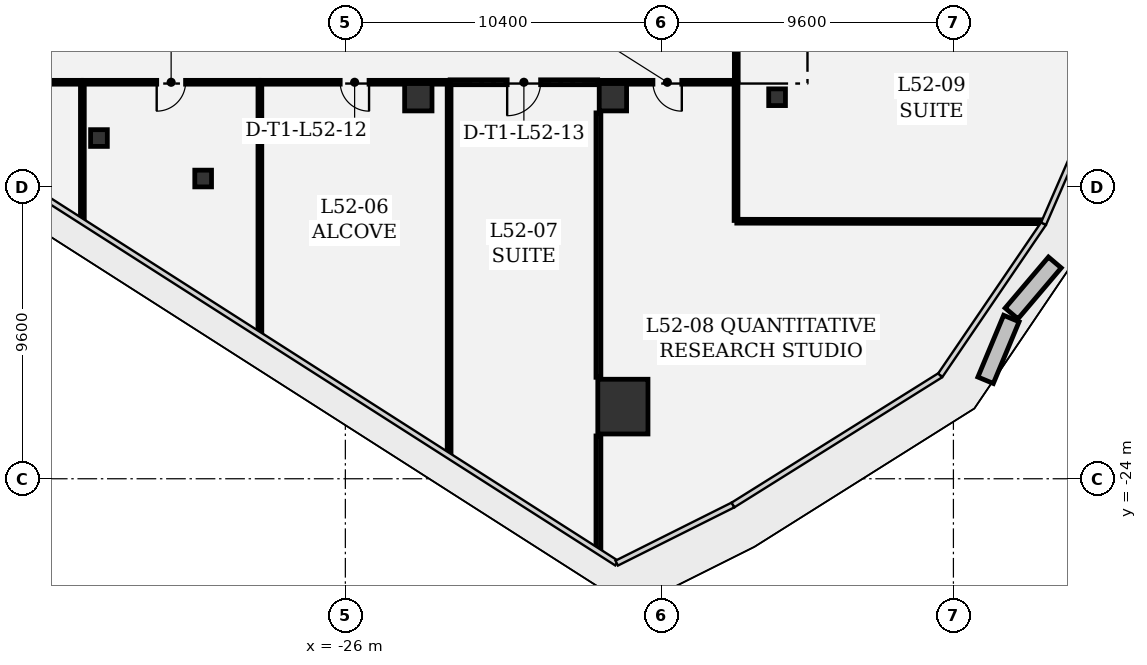
"""IFC4 building model, lengths in metres.
Left out: names, types, materials, properties, quantities, classifications, styles, units other than length and angle.
Written with IfcOpenShell. Run it as: python <this file> out.ifc"""

import sys

from ifc_helpers import new_model, si_unit, direction, frame, frame_2d, origin, origin_2d, place, context, subcontext, project, spatial, rectangle, extrude, element, fill, save


model = new_model("IFC4")
c1 = context("Model", 3, precision=1e-05, world=origin(), true_north=direction((0.0, 1.0)))
c2 = subcontext(c1, "Body", "Model", "MODEL_VIEW")
j1 = project(units=[si_unit("LENGTHUNIT", "METRE"), si_unit("PLANEANGLEUNIT", "RADIAN")], contexts=[c1])
p1 = place(None, origin())
s1 = spatial("IfcSite", under=j1, at=p1, CompositionType="ELEMENT")
p2 = place(p1, origin())
s2 = spatial("IfcBuilding", under=s1, at=p2, CompositionType="ELEMENT")
p3 = place(p2, frame((0.0, 0.0, 225.3)))
s3 = spatial("IfcBuildingStorey", under=s2, at=p3, CompositionType="ELEMENT", Elevation=225.3)
p4 = place(p3, frame((-16.872, -21.627, 0.0), z_axis=(0.0, 0.0, 1.0), x_axis=(1.0, 0.0, 0.0)))
e1 = element("IfcColumn", 1, at=p4, inside=s3, PredefinedType="COLUMN", context=c2, shape_type="SweptSolid", body=[
    extrude(rectangle(XDim=1.65, YDim=1.8, at=origin_2d()), origin(), (0.0, 0.0, 1.0), 4.05),
])
for number, where, z_axis, x_axis in (
    (2, (-17.2, -11.45, 0.0), (0.0, 0.0, 1.0), (1.0, 0.0, 0.0)),
    (3, (-23.6, -11.45, 0.0), (0.0, 0.0, 1.0), (1.0, 0.0, 0.0)),
):
    element("IfcColumn", number, at=place(p3, frame(where, z_axis=z_axis, x_axis=x_axis)), inside=s3, PredefinedType="COLUMN", context=c2, shape_type="SweptSolid", body=[
        extrude(rectangle(XDim=0.9, YDim=0.9, at=origin_2d()), origin(), (0.0, 0.0, 1.0), 4.05),
    ])
for number, where, z_axis, x_axis in (
    (4, (-34.104, -12.792, 0.0), (0.0, 0.0, 1.0), (1.0, 0.0, 0.0)),
    (5, (-30.677, -14.124, 0.0), (0.0, 0.0, 1.0), (1.0, 0.0, 0.0)),
    (6, (-11.8, -11.45, 0.0), (0.0, 0.0, 1.0), (1.0, 0.0, 0.0)),
):
    element("IfcColumn", number, at=place(p3, frame(where, z_axis=z_axis, x_axis=x_axis)), inside=s3, PredefinedType="COLUMN", context=c2, shape_type="SweptSolid", body=[
        extrude(rectangle(XDim=0.55, YDim=0.55, at=origin_2d()), origin(), (0.0, 0.0, 1.0), 4.05),
    ])
p5 = place(p3, frame((-28.836, -10.958, 0.0), z_axis=(0.0, 0.0, 1.0), x_axis=(-1.0, 0.0, 0.0)))
e7 = element("IfcWall", 7, at=p5, inside=s3, PredefinedType="PARTITIONING", context=c2, shape_type="SweptSolid", body=[
    extrude(rectangle(XDim=5.789, YDim=0.125, at=frame_2d((2.895, 0.0))), origin(), (0.0, 0.0, 1.0), 3.0),
])
p6 = place(p5, frame((2.419, 0.0, 0.0)))
e8 = element("IfcOpeningElement", 8, at=p6, cuts=e7, PredefinedType="OPENING", context=c2, shape_type="SweptSolid", body=[
    extrude(rectangle(XDim=0.95, YDim=2.15, at=frame_2d((0.475, 1.075))), frame((0.0, 0.073, 0.0), z_axis=(0.0, -1.0, 0.0), x_axis=(1.0, 0.0, 0.0)), (0.0, 0.0, 1.0), 0.145),
])
p7 = place(p3, frame((-34.65, -10.983, 0.0), z_axis=(0.0, 0.0, 1.0), x_axis=(0.0, -1.0, 0.0)))
e9 = element("IfcWall", 9, at=p7, inside=s3, PredefinedType="PARTITIONING", context=c2, shape_type="SweptSolid", body=[
    extrude(rectangle(XDim=4.479, YDim=0.125, at=frame_2d((2.24, 0.0))), origin(), (0.0, 0.0, 1.0), 3.78),
])
p8 = place(p3, frame((-28.811, -19.194, 0.0), z_axis=(0.0, 0.0, 1.0), x_axis=(0.0, 1.0, 0.0)))
e10 = element("IfcWall", 10, at=p8, inside=s3, PredefinedType="PARTITIONING", context=c2, shape_type="SweptSolid", body=[
    extrude(rectangle(XDim=8.211, YDim=0.125, at=frame_2d((4.105, 0.0))), origin(), (0.0, 0.0, 1.0), 3.78),
])
p9 = place(p3, frame((-22.612, -10.958, 0.0), z_axis=(0.0, 0.0, 1.0), x_axis=(-1.0, 0.0, 0.0)))
e11 = element("IfcWall", 11, at=p9, inside=s3, PredefinedType="PARTITIONING", context=c2, shape_type="SweptSolid", body=[
    extrude(rectangle(XDim=6.166, YDim=0.125, at=frame_2d((3.083, 0.0))), origin(), (0.0, 0.0, 1.0), 3.78),
])
p10 = place(p9, frame((2.608, 0.0, 0.0)))
e12 = element("IfcOpeningElement", 12, at=p10, cuts=e11, PredefinedType="OPENING", context=c2, shape_type="SweptSolid", body=[
    extrude(rectangle(XDim=0.95, YDim=2.15, at=frame_2d((0.475, 1.075))), frame((0.0, 0.073, 0.0), z_axis=(0.0, -1.0, 0.0), x_axis=(1.0, 0.0, 0.0)), (0.0, 0.0, 1.0), 0.145),
])
p11 = place(p3, frame((-22.587, -23.172, 0.0), z_axis=(0.0, 0.0, 1.0), x_axis=(0.0, 1.0, 0.0)))
e13 = element("IfcWall", 13, at=p11, inside=s3, PredefinedType="PARTITIONING", context=c2, shape_type="SweptSolid", body=[
    extrude(rectangle(XDim=12.189, YDim=0.125, at=frame_2d((6.094, 0.0))), origin(), (0.0, 0.0, 1.0), 2.977),
])
p12 = place(p3, frame((-17.676, -26.311, 0.0), z_axis=(0.0, 0.0, 1.0), x_axis=(0.0, 1.0, 0.0)))
e14 = element("IfcWall", 14, at=p12, inside=s3, PredefinedType="PARTITIONING", context=c2, shape_type="SweptSolid", body=[
    extrude(rectangle(XDim=3.719, YDim=0.16, at=frame_2d((1.859, 0.0))), origin(), (0.0, 0.0, 1.0), 3.78),
])
p13 = place(p3, frame((-17.676, -20.662, 0.0), z_axis=(0.0, 0.0, 1.0), x_axis=(0.0, 1.0, 0.0)))
e15 = element("IfcWall", 15, at=p13, inside=s3, PredefinedType="PARTITIONING", context=c2, shape_type="SweptSolid", body=[
    extrude(rectangle(XDim=8.697, YDim=0.16, at=frame_2d((4.349, 0.0))), origin(), (0.0, 0.0, 1.0), 2.977),
])
p14 = place(p3, frame((-17.701, -10.958, 0.0), z_axis=(0.0, 0.0, 1.0), x_axis=(-1.0, 0.0, 0.0)))
e16 = element("IfcWall", 16, at=p14, inside=s3, PredefinedType="PARTITIONING", context=c2, shape_type="SweptSolid", body=[
    extrude(rectangle(XDim=4.853, YDim=0.16, at=frame_2d((2.427, 0.0))), origin(), (0.0, 0.0, 1.0), 3.344),
])
p15 = place(p14, frame((1.877, 0.0, 0.0)))
e17 = element("IfcOpeningElement", 17, at=p15, cuts=e16, PredefinedType="OPENING", context=c2, shape_type="SweptSolid", body=[
    extrude(rectangle(XDim=1.1, YDim=2.15, at=frame_2d((0.55, 1.075))), frame((0.0, 0.09, 0.0), z_axis=(0.0, -1.0, 0.0), x_axis=(1.0, 0.0, 0.0)), (0.0, 0.0, 1.0), 0.18),
])
p16 = place(p3, frame((-3.088, -15.545, 0.0), z_axis=(0.0, 0.0, 1.0), x_axis=(-0.999998671921, 0.001629771613, 0.0)))
e18 = element("IfcWall", 18, at=p16, inside=s3, PredefinedType="PARTITIONING", context=c2, shape_type="SweptSolid", body=[
    extrude(rectangle(XDim=10.037, YDim=0.125, at=frame_2d((5.018, 0.0))), origin(), (0.0, 0.0, 1.0), 3.78),
])
p17 = place(p3, frame((-13.15, -10.983, 0.0), z_axis=(0.0, 0.0, 1.0), x_axis=(0.0, -1.0, 0.0)))
e19 = element("IfcWall", 19, at=p17, inside=s3, PredefinedType="PARTITIONING", context=c2, shape_type="SweptSolid", body=[
    extrude(rectangle(XDim=4.521, YDim=0.125, at=frame_2d((2.26, 0.0))), origin(), (0.0, 0.0, 1.0), 3.78),
])
p18 = place(p3, frame((-13.175, -10.958, 0.0), z_axis=(0.0, 0.0, 1.0), x_axis=(-1.0, 0.0, 0.0)))
e20 = element("IfcWall", 20, at=p18, inside=s3, PredefinedType="PARTITIONING", context=c2, shape_type="SweptSolid", body=[
    extrude(rectangle(XDim=4.468, YDim=0.125, at=frame_2d((2.234, 0.0))), origin(), (0.0, 0.0, 1.0), 3.344),
])
p19 = place(p18, frame((1.759, 0.0, 0.0)))
e21 = element("IfcOpeningElement", 21, at=p19, cuts=e20, PredefinedType="OPENING", context=c2, shape_type="SweptSolid", body=[
    extrude(rectangle(XDim=0.95, YDim=2.15, at=frame_2d((0.475, 1.075))), frame((0.0, 0.073, 0.0), z_axis=(0.0, -1.0, 0.0), x_axis=(1.0, 0.0, 0.0)), (0.0, 0.0, 1.0), 0.145),
])
p20 = place(p3, frame((-13.142, -7.506, 0.0), z_axis=(0.0, 0.0, 1.0), x_axis=(0.0, -1.0, 0.0)))
e22 = element("IfcWall", 22, at=p20, inside=s3, PredefinedType="PARTITIONING", context=c2, shape_type="SweptSolid", body=[
    extrude(rectangle(XDim=3.452, YDim=0.125, at=frame_2d((1.726, 0.0))), origin(), (0.0, 0.0, 1.0), 3.0),
])
p21 = place(p20, frame((1.251, 0.0, 0.0)))
e23 = element("IfcOpeningElement", 23, at=p21, cuts=e22, PredefinedType="OPENING", context=c2, shape_type="SweptSolid", body=[
    extrude(rectangle(XDim=0.95, YDim=2.15, at=frame_2d((0.475, 1.075))), frame((0.0, 0.073, 0.0), z_axis=(0.0, -1.0, 0.0), x_axis=(1.0, 0.0, 0.0)), (0.0, 0.0, 1.0), 0.145),
])
p22 = place(p3, frame((-37.833, -10.958, 0.0), z_axis=(0.0, 0.0, 1.0), x_axis=(1.0, 0.0, 0.0)))
e24 = element("IfcWall", 24, at=p22, inside=s3, PredefinedType="PARTITIONING", context=c2, shape_type="SweptSolid", body=[
    extrude(rectangle(XDim=3.15, YDim=0.125, at=frame_2d((1.575, 0.0))), origin(), (0.0, 0.0, 1.0), 3.0),
])
p23 = place(p6, origin())
e25 = element("IfcDoor", 25, at=p23, inside=s3, OperationType="SINGLE_SWING_RIGHT", PredefinedType="DOOR", context=c2, shape_type="SweptSolid", body=[
    extrude(rectangle(XDim=0.95, YDim=2.15, at=frame_2d((0.475, 1.075))), frame((0.0, 0.025, 0.0), z_axis=(0.0, -1.0, 0.0), x_axis=(1.0, 0.0, 0.0)), (0.0, 0.0, 1.0), 0.05),
])
fill(e8, e25)
p24 = place(p10, origin())
e26 = element("IfcDoor", 26, at=p24, inside=s3, OperationType="SINGLE_SWING_LEFT", PredefinedType="DOOR", context=c2, shape_type="SweptSolid", body=[
    extrude(rectangle(XDim=0.95, YDim=2.15, at=frame_2d((0.475, 1.075))), frame((0.0, 0.025, 0.0), z_axis=(0.0, -1.0, 0.0), x_axis=(1.0, 0.0, 0.0)), (0.0, 0.0, 1.0), 0.05),
])
fill(e12, e26)
p25 = place(p15, origin())
e27 = element("IfcDoor", 27, at=p25, inside=s3, OperationType="SINGLE_SWING_RIGHT", PredefinedType="DOOR", context=c2, shape_type="SweptSolid", body=[
    extrude(rectangle(XDim=1.1, YDim=2.15, at=frame_2d((0.55, 1.075))), frame((0.0, 0.025, 0.0), z_axis=(0.0, -1.0, 0.0), x_axis=(1.0, 0.0, 0.0)), (0.0, 0.0, 1.0), 0.05),
])
fill(e17, e27)
p26 = place(p19, origin())
e28 = element("IfcDoor", 28, at=p26, inside=s3, OperationType="SINGLE_SWING_LEFT", PredefinedType="DOOR", context=c2, shape_type="SweptSolid", body=[
    extrude(rectangle(XDim=0.95, YDim=2.15, at=frame_2d((0.475, 1.075))), frame((0.0, 0.025, 0.0), z_axis=(0.0, -1.0, 0.0), x_axis=(1.0, 0.0, 0.0)), (0.0, 0.0, 1.0), 0.05),
])
fill(e21, e28)
save(model, sys.argv[1])
